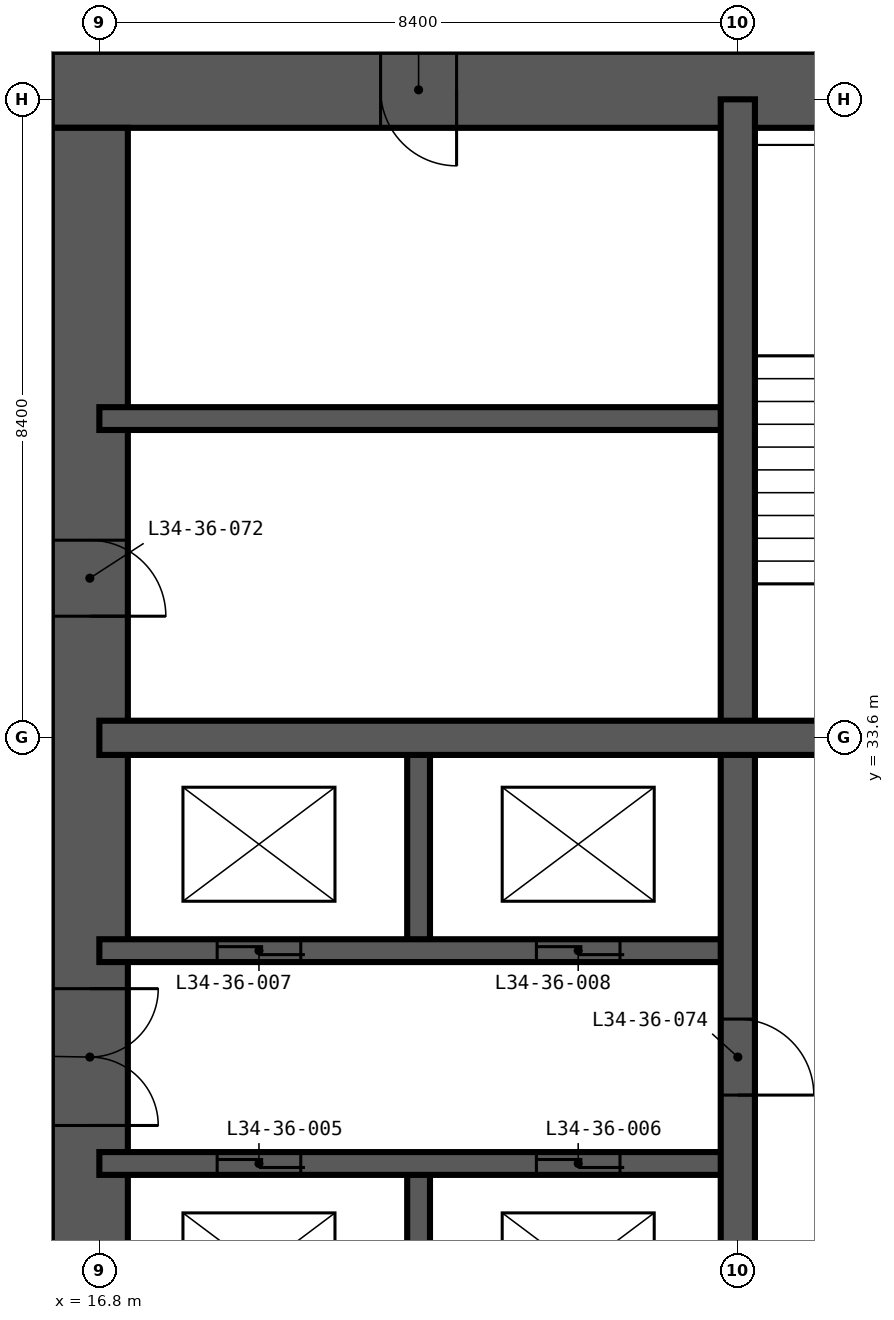
"""IFC4 building model, lengths in metres.
Left out: names, types, materials, properties, quantities, classifications, styles, units other than length and angle.
Written with IfcOpenShell. Run it as: python <this file> out.ifc"""

import sys

from ifc_helpers import new_model, si_unit, direction, frame, frame_2d, origin, place, context, subcontext, project, spatial, rectangle, extrude, element, fill, save


model = new_model("IFC4")
c1 = context("Model", 3, precision=1e-05, world=origin(), true_north=direction((0.0, 1.0)))
c2 = subcontext(c1, "Body", "Model", "MODEL_VIEW")
j1 = project(units=[si_unit("LENGTHUNIT", "METRE"), si_unit("PLANEANGLEUNIT", "RADIAN")], contexts=[c1])
p1 = place(None, origin())
s1 = spatial("IfcSite", under=j1, at=p1, CompositionType="ELEMENT")
p2 = place(p1, origin())
s2 = spatial("IfcBuilding", under=s1, at=p2, CompositionType="ELEMENT")
p3 = place(p2, frame((0.0, 0.0, 133.2)))
s3 = spatial("IfcBuildingStorey", under=s2, at=p3, CompositionType="ELEMENT", Elevation=133.2)
p4 = place(p3, frame((42.625, 42.125, -0.35), z_axis=(0.0, 0.0, 1.0), x_axis=(-1.0, 0.0, 0.0)))
e1 = element("IfcWall", 1, at=p4, inside=s3, PredefinedType="SHEAR", context=c2, shape_type="SweptSolid", body=[
    extrude(rectangle(XDim=26.45, YDim=1.0, at=frame_2d((13.225, 0.0))), origin(), (0.0, 0.0, 1.0), 3.6),
])
p5 = place(p4, frame((21.125, 0.0, 0.35)))
e2 = element("IfcOpeningElement", 2, at=p5, cuts=e1, PredefinedType="OPENING", context=c2, shape_type="SweptSolid", body=[
    extrude(rectangle(XDim=1.0, YDim=2.1, at=frame_2d((0.5, 1.05))), frame((0.0, 0.51, 0.0), z_axis=(0.0, -1.0, 0.0), x_axis=(1.0, 0.0, 0.0)), (0.0, 0.0, 1.0), 1.02),
])
p6 = place(p4, frame((10.525, 0.0, 0.35)))
e3 = element("IfcOpeningElement", 3, at=p6, cuts=e1, PredefinedType="OPENING", context=c2, shape_type="SweptSolid", body=[
    extrude(rectangle(XDim=1.2, YDim=2.2, at=frame_2d((0.6, 1.1))), frame((0.0, 0.51, 0.0), z_axis=(0.0, -1.0, 0.0), x_axis=(1.0, 0.0, 0.0)), (0.0, 0.0, 1.0), 1.02),
])
p7 = place(p3, frame((16.675, 41.625, -0.35), z_axis=(0.0, 0.0, 1.0), x_axis=(0.0, -1.0, 0.0)))
e4 = element("IfcWall", 4, at=p7, inside=s3, PredefinedType="SHEAR", context=c2, shape_type="SweptSolid", body=[
    extrude(rectangle(XDim=24.45, YDim=1.0, at=frame_2d((12.225, 0.0))), origin(), (0.0, 0.0, 1.0), 3.6),
])
p8 = place(p7, frame((11.325, 0.0, 0.35)))
e5 = element("IfcOpeningElement", 5, at=p8, cuts=e4, PredefinedType="OPENING", context=c2, shape_type="SweptSolid", body=[
    extrude(rectangle(XDim=1.8, YDim=2.2, at=frame_2d((0.9, 1.1))), frame((0.0, 0.51, 0.0), z_axis=(0.0, -1.0, 0.0), x_axis=(1.0, 0.0, 0.0)), (0.0, 0.0, 1.0), 1.02),
])
p9 = place(p7, frame((20.125, 0.0, 0.35)))
e6 = element("IfcOpeningElement", 6, at=p9, cuts=e4, PredefinedType="OPENING", context=c2, shape_type="SweptSolid", body=[
    extrude(rectangle(XDim=1.0, YDim=2.1, at=frame_2d((0.5, 1.05))), frame((0.0, 0.51, 0.0), z_axis=(0.0, -1.0, 0.0), x_axis=(1.0, 0.0, 0.0)), (0.0, 0.0, 1.0), 1.02),
])
p10 = place(p7, frame((5.425, 0.0, 0.35)))
e7 = element("IfcOpeningElement", 7, at=p10, cuts=e4, PredefinedType="OPENING", context=c2, shape_type="SweptSolid", body=[
    extrude(rectangle(XDim=1.0, YDim=2.1, at=frame_2d((0.5, 1.05))), frame((0.0, 0.51, 0.0), z_axis=(0.0, -1.0, 0.0), x_axis=(1.0, 0.0, 0.0)), (0.0, 0.0, 1.0), 1.02),
])
p11 = place(p3, frame((21.0, 22.4, -0.35), z_axis=(0.0, 0.0, 1.0), x_axis=(0.0, 1.0, 0.0)))
e8 = element("IfcWall", 8, at=p11, inside=s3, PredefinedType="SHEAR", context=c2, shape_type="SweptSolid", body=[
    extrude(rectangle(XDim=5.6, YDim=0.3, at=frame_2d((2.8, 0.0))), origin(), (0.0, 0.0, 1.0), 3.6),
])
p12 = place(p3, frame((21.0, 30.8, -0.35), z_axis=(0.0, 0.0, 1.0), x_axis=(0.0, 1.0, 0.0)))
e9 = element("IfcWall", 9, at=p12, inside=s3, PredefinedType="SHEAR", context=c2, shape_type="SweptSolid", body=[
    extrude(rectangle(XDim=2.8, YDim=0.3, at=frame_2d((1.4, 0.0))), origin(), (0.0, 0.0, 1.0), 3.6),
])
p13 = place(p3, frame((16.8, 28.0, -0.35), z_axis=(0.0, 0.0, 1.0), x_axis=(1.0, 0.0, 0.0)))
e10 = element("IfcWall", 10, at=p13, inside=s3, PredefinedType="SHEAR", context=c2, shape_type="SweptSolid", body=[
    extrude(rectangle(XDim=8.4, YDim=0.3, at=frame_2d((4.2, 0.0))), origin(), (0.0, 0.0, 1.0), 3.6),
])
p14 = place(p13, frame((1.55, 0.0, 0.35)))
e11 = element("IfcOpeningElement", 11, at=p14, cuts=e10, PredefinedType="OPENING", context=c2, shape_type="SweptSolid", body=[
    extrude(rectangle(XDim=1.1, YDim=2.2, at=frame_2d((0.55, 1.1))), frame((0.0, 0.16, 0.0), z_axis=(0.0, -1.0, 0.0), x_axis=(1.0, 0.0, 0.0)), (0.0, 0.0, 1.0), 0.32),
])
p15 = place(p13, frame((5.75, 0.0, 0.35)))
e12 = element("IfcOpeningElement", 12, at=p15, cuts=e10, PredefinedType="OPENING", context=c2, shape_type="SweptSolid", body=[
    extrude(rectangle(XDim=1.1, YDim=2.2, at=frame_2d((0.55, 1.1))), frame((0.0, 0.16, 0.0), z_axis=(0.0, -1.0, 0.0), x_axis=(1.0, 0.0, 0.0)), (0.0, 0.0, 1.0), 0.32),
])
p16 = place(p3, frame((16.8, 30.8, -0.35), z_axis=(0.0, 0.0, 1.0), x_axis=(1.0, 0.0, 0.0)))
e13 = element("IfcWall", 13, at=p16, inside=s3, PredefinedType="SHEAR", context=c2, shape_type="SweptSolid", body=[
    extrude(rectangle(XDim=8.4, YDim=0.3, at=frame_2d((4.2, 0.0))), origin(), (0.0, 0.0, 1.0), 3.6),
])
p17 = place(p16, frame((1.55, 0.0, 0.35)))
e14 = element("IfcOpeningElement", 14, at=p17, cuts=e13, PredefinedType="OPENING", context=c2, shape_type="SweptSolid", body=[
    extrude(rectangle(XDim=1.1, YDim=2.2, at=frame_2d((0.55, 1.1))), frame((0.0, 0.16, 0.0), z_axis=(0.0, -1.0, 0.0), x_axis=(1.0, 0.0, 0.0)), (0.0, 0.0, 1.0), 0.32),
])
p18 = place(p16, frame((5.75, 0.0, 0.35)))
e15 = element("IfcOpeningElement", 15, at=p18, cuts=e13, PredefinedType="OPENING", context=c2, shape_type="SweptSolid", body=[
    extrude(rectangle(XDim=1.1, YDim=2.2, at=frame_2d((0.55, 1.1))), frame((0.0, 0.16, 0.0), z_axis=(0.0, -1.0, 0.0), x_axis=(1.0, 0.0, 0.0)), (0.0, 0.0, 1.0), 0.32),
])
p19 = place(p3, frame((16.8, 37.8, -0.35), z_axis=(0.0, 0.0, 1.0), x_axis=(1.0, 0.0, 0.0)))
e16 = element("IfcWall", 16, at=p19, inside=s3, PredefinedType="SHEAR", context=c2, shape_type="SweptSolid", body=[
    extrude(rectangle(XDim=8.4, YDim=0.3, at=frame_2d((4.2, 0.0))), origin(), (0.0, 0.0, 1.0), 3.6),
])
p20 = place(p3, frame((25.2, 16.8, -0.35), z_axis=(0.0, 0.0, 1.0), x_axis=(0.0, 1.0, 0.0)))
e17 = element("IfcWall", 17, at=p20, inside=s3, PredefinedType="SHEAR", context=c2, shape_type="SweptSolid", body=[
    extrude(rectangle(XDim=25.2, YDim=0.45, at=frame_2d((12.6, 0.0))), origin(), (0.0, 0.0, 1.0), 3.6),
])
p21 = place(p20, frame((12.1, 0.0, 0.35)))
e18 = element("IfcOpeningElement", 18, at=p21, cuts=e17, PredefinedType="OPENING", context=c2, shape_type="SweptSolid", body=[
    extrude(rectangle(XDim=1.0, YDim=2.1, at=frame_2d((0.5, 1.05))), frame((0.0, 0.235, 0.0), z_axis=(0.0, -1.0, 0.0), x_axis=(1.0, 0.0, 0.0)), (0.0, 0.0, 1.0), 0.47),
])
p22 = place(p3, frame((16.8, 33.6, -0.35), z_axis=(0.0, 0.0, 1.0), x_axis=(1.0, 0.0, 0.0)))
e19 = element("IfcWall", 19, at=p22, inside=s3, PredefinedType="SHEAR", context=c2, shape_type="SweptSolid", body=[
    extrude(rectangle(XDim=25.2, YDim=0.45, at=frame_2d((12.6, 0.0))), origin(), (0.0, 0.0, 1.0), 3.6),
])
p23 = place(p22, frame((22.6, 0.0, 0.35)))
e20 = element("IfcOpeningElement", 20, at=p23, cuts=e19, PredefinedType="OPENING", context=c2, shape_type="SweptSolid", body=[
    extrude(rectangle(XDim=1.0, YDim=2.1, at=frame_2d((0.5, 1.05))), frame((0.0, 0.235, 0.0), z_axis=(0.0, -1.0, 0.0), x_axis=(1.0, 0.0, 0.0)), (0.0, 0.0, 1.0), 0.47),
])
p24 = place(p14, origin())
e21 = element("IfcDoor", 21, at=p24, inside=s3, OperationType="DOUBLE_DOOR_SLIDING", PredefinedType="DOOR", context=c2, shape_type="SweptSolid", body=[
    extrude(rectangle(XDim=1.1, YDim=2.2, at=frame_2d((0.55, 1.1))), frame((0.0, 0.025, 0.0), z_axis=(0.0, -1.0, 0.0), x_axis=(1.0, 0.0, 0.0)), (0.0, 0.0, 1.0), 0.05),
])
fill(e11, e21)
p25 = place(p15, origin())
e22 = element("IfcDoor", 22, at=p25, inside=s3, OperationType="DOUBLE_DOOR_SLIDING", PredefinedType="DOOR", context=c2, shape_type="SweptSolid", body=[
    extrude(rectangle(XDim=1.1, YDim=2.2, at=frame_2d((0.55, 1.1))), frame((0.0, 0.025, 0.0), z_axis=(0.0, -1.0, 0.0), x_axis=(1.0, 0.0, 0.0)), (0.0, 0.0, 1.0), 0.05),
])
fill(e12, e22)
p26 = place(p17, origin())
e23 = element("IfcDoor", 23, at=p26, inside=s3, OperationType="DOUBLE_DOOR_SLIDING", PredefinedType="DOOR", context=c2, shape_type="SweptSolid", body=[
    extrude(rectangle(XDim=1.1, YDim=2.2, at=frame_2d((0.55, 1.1))), frame((0.0, 0.025, 0.0), z_axis=(0.0, -1.0, 0.0), x_axis=(1.0, 0.0, 0.0)), (0.0, 0.0, 1.0), 0.05),
])
fill(e14, e23)
p27 = place(p18, origin())
e24 = element("IfcDoor", 24, at=p27, inside=s3, OperationType="DOUBLE_DOOR_SLIDING", PredefinedType="DOOR", context=c2, shape_type="SweptSolid", body=[
    extrude(rectangle(XDim=1.1, YDim=2.2, at=frame_2d((0.55, 1.1))), frame((0.0, 0.025, 0.0), z_axis=(0.0, -1.0, 0.0), x_axis=(1.0, 0.0, 0.0)), (0.0, 0.0, 1.0), 0.05),
])
fill(e15, e24)
p28 = place(p8, origin())
e25 = element("IfcDoor", 25, at=p28, inside=s3, OperationType="DOUBLE_DOOR_DOUBLE_SWING", PredefinedType="DOOR", context=c2, shape_type="SweptSolid", body=[
    extrude(rectangle(XDim=1.8, YDim=2.2, at=frame_2d((0.9, 1.1))), frame((0.0, 0.025, 0.0), z_axis=(0.0, -1.0, 0.0), x_axis=(1.0, 0.0, 0.0)), (0.0, 0.0, 1.0), 0.05),
])
fill(e5, e25)
p29 = place(p10, origin())
e26 = element("IfcDoor", 26, at=p29, inside=s3, OperationType="SINGLE_SWING_RIGHT", PredefinedType="DOOR", context=c2, shape_type="SweptSolid", body=[
    extrude(rectangle(XDim=1.0, YDim=2.1, at=frame_2d((0.5, 1.05))), frame((0.0, 0.025, 0.0), z_axis=(0.0, -1.0, 0.0), x_axis=(1.0, 0.0, 0.0)), (0.0, 0.0, 1.0), 0.05),
])
fill(e7, e26)
p30 = place(p5, origin())
e27 = element("IfcDoor", 27, at=p30, inside=s3, OperationType="SINGLE_SWING_LEFT", PredefinedType="DOOR", context=c2, shape_type="SweptSolid", body=[
    extrude(rectangle(XDim=1.0, YDim=2.1, at=frame_2d((0.5, 1.05))), frame((0.0, 0.025, 0.0), z_axis=(0.0, -1.0, 0.0), x_axis=(1.0, 0.0, 0.0)), (0.0, 0.0, 1.0), 0.05),
])
fill(e2, e27)
p31 = place(p21, frame((1.0, 0.0, 0.0), z_axis=(0.0, 0.0, 1.0), x_axis=(-1.0, 0.0, 0.0)))
e28 = element("IfcDoor", 28, at=p31, inside=s3, OperationType="SINGLE_SWING_RIGHT", PredefinedType="DOOR", context=c2, shape_type="SweptSolid", body=[
    extrude(rectangle(XDim=1.0, YDim=2.1, at=frame_2d((0.5, 1.05))), frame((0.0, 0.025, 0.0), z_axis=(0.0, -1.0, 0.0), x_axis=(1.0, 0.0, 0.0)), (0.0, 0.0, 1.0), 0.05),
])
fill(e18, e28)
save(model, sys.argv[1])
